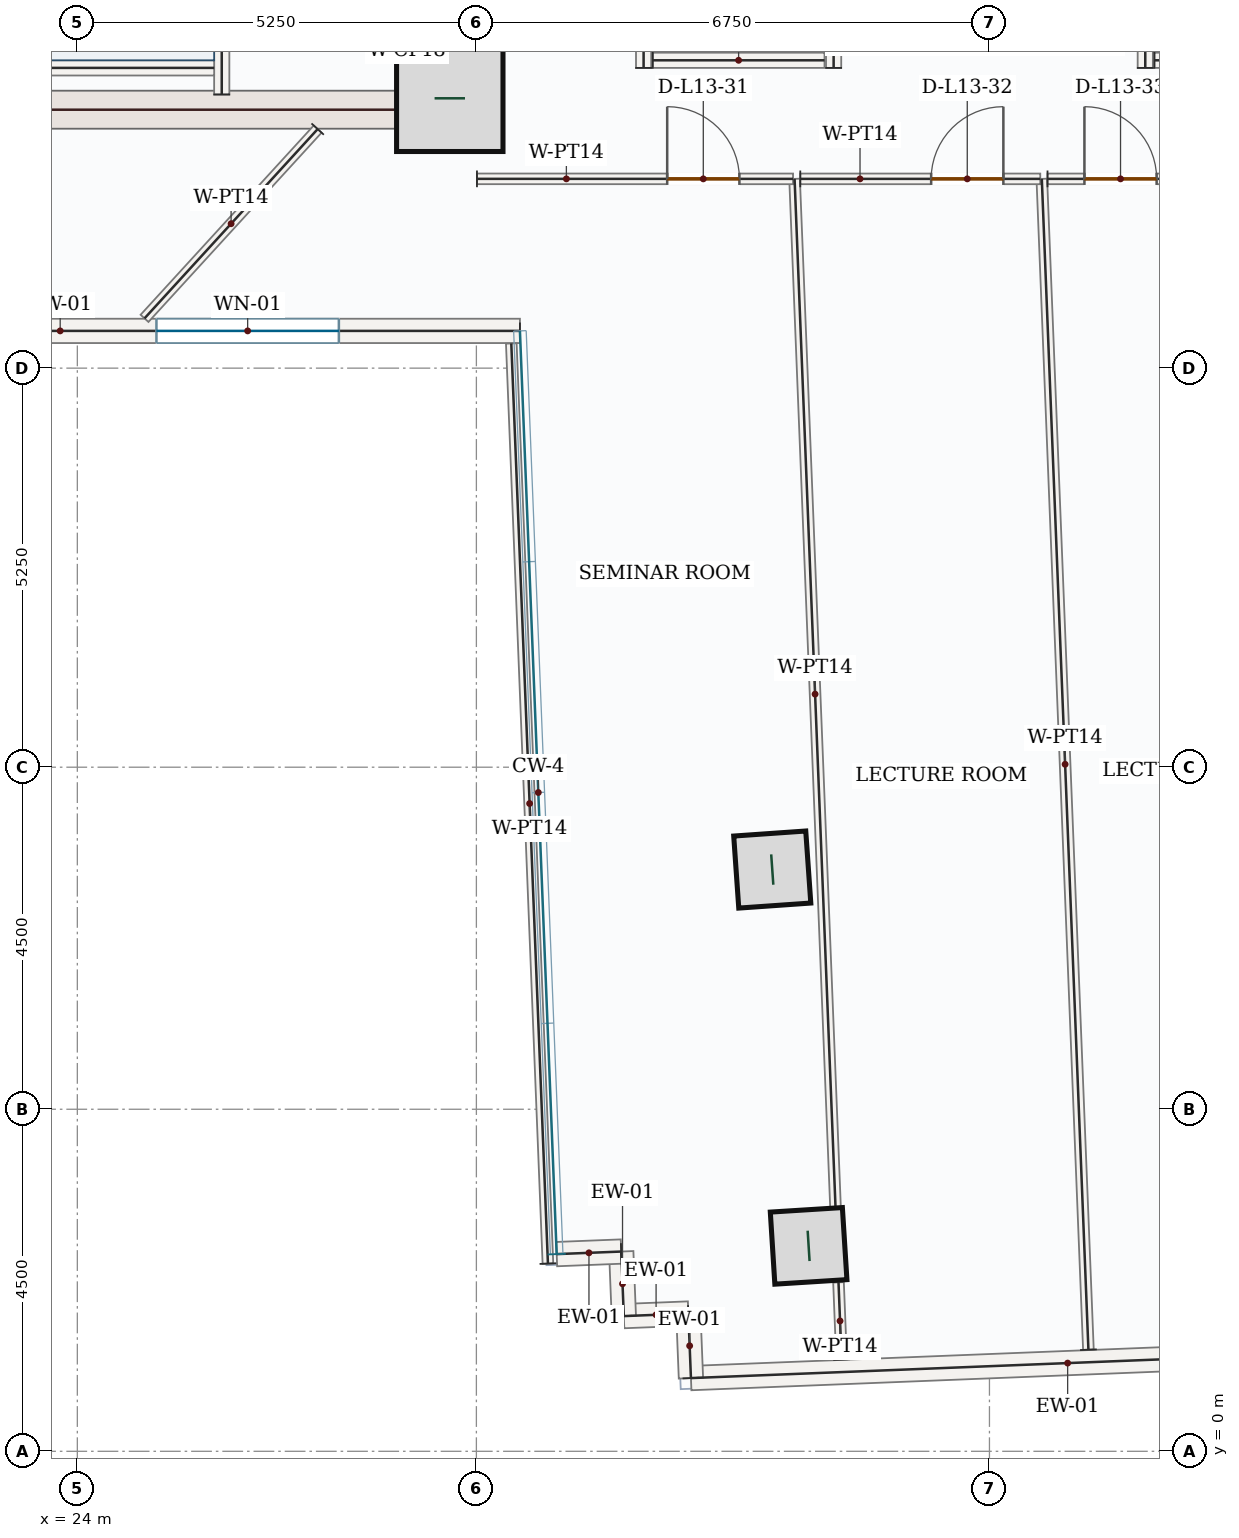
"""IFC4 building model, lengths in metres.
Left out: names, types, materials, properties, quantities, classifications, styles, units other than length and angle.
Written with IfcOpenShell. Run it as: python <this file> out.ifc"""

import sys

from ifc_helpers import new_model, si_unit, direction, frame, frame_2d, origin, origin_2d, place, context, subcontext, project, spatial, rectangle, hollow_rectangle, extrude, source, transform, mapped, element, fill, save


model = new_model("IFC4")
c1 = context("Model", 3, precision=1e-05, world=origin(), true_north=direction((0.0, 1.0)))
c2 = subcontext(c1, "Body", "Model", "MODEL_VIEW")
j1 = project(units=[si_unit("LENGTHUNIT", "METRE"), si_unit("PLANEANGLEUNIT", "RADIAN")], contexts=[c1])
p1 = place(None, origin())
s1 = spatial("IfcSite", under=j1, at=p1, CompositionType="ELEMENT")
p2 = place(p1, origin())
s2 = spatial("IfcBuilding", under=s1, at=p2, CompositionType="ELEMENT")
p3 = place(p2, frame((0.0, 0.0, 62.7)))
s3 = spatial("IfcBuildingStorey", under=s2, at=p3, CompositionType="ELEMENT", Elevation=62.7)
p4 = place(p3, frame((29.0, 17.4, 0.0), z_axis=(0.0, 0.0, 1.0), x_axis=(0.0, 1.0, 0.0)))
e1 = element("IfcWall", 1, at=p4, inside=s3, PredefinedType="SHEAR", context=c2, shape_type="SweptSolid", body=[
    extrude(rectangle(XDim=8.55, YDim=0.5, at=frame_2d((4.275, 0.0))), origin(), (0.0, 0.0, 1.0), 3.95),
])
p5 = place(p4, frame((6.65, 0.0, 0.0)))
e2 = element("IfcOpeningElement", 2, at=p5, cuts=e1, PredefinedType="OPENING", context=c2, shape_type="SweptSolid", body=[
    extrude(rectangle(XDim=1.1, YDim=2.2, at=frame_2d((0.55, 1.1))), frame((0.0, 0.26, 0.0), z_axis=(0.0, -1.0, 0.0), x_axis=(1.0, 0.0, 0.0)), (0.0, 0.0, 1.0), 0.52),
])
p6 = place(p4, frame((2.7, 0.0, 0.0)))
e3 = element("IfcOpeningElement", 3, at=p6, cuts=e1, PredefinedType="OPENING", context=c2, shape_type="SweptSolid", body=[
    extrude(rectangle(XDim=0.88, YDim=2.1, at=frame_2d((0.44, 1.05))), frame((0.0, 0.26, 0.0), z_axis=(0.0, -1.0, 0.0), x_axis=(1.0, 0.0, 0.0)), (0.0, 0.0, 1.0), 0.52),
])
p7 = place(p4, frame((4.6, 0.0, 0.0)))
e4 = element("IfcOpeningElement", 4, at=p7, cuts=e1, PredefinedType="OPENING", context=c2, shape_type="SweptSolid", body=[
    extrude(rectangle(XDim=0.88, YDim=2.1, at=frame_2d((0.44, 1.05))), frame((0.0, 0.26, 0.0), z_axis=(0.0, -1.0, 0.0), x_axis=(1.0, 0.0, 0.0)), (0.0, 0.0, 1.0), 0.52),
])
m1 = source(origin(), c2, "Body", "SweptSolid", [
    extrude(rectangle(XDim=7.0, YDim=0.5, at=frame_2d((3.5, 0.0))), origin(), (0.0, 0.0, 1.0), 3.95),
])
p8 = place(p3, frame((21.75, 17.65, 0.0), z_axis=(0.0, 0.0, 1.0), x_axis=(1.0, 0.0, 0.0)))
e5 = element("IfcWall", 5, at=p8, inside=s3, PredefinedType="SHEAR", context=c2, shape_type="MappedRepresentation", body=[
    mapped(m1, transform((0.0, 0.0, 0.0), x_axis=(1.0, 0.0, 0.0), y_axis=(0.0, 1.0, 0.0), z_axis=(0.0, 0.0, 1.0), scale=1.0)),
])
m2 = source(origin(), c2, "Body", "SweptSolid", [
    extrude(rectangle(XDim=1.4, YDim=1.4, at=origin_2d()), origin(), (0.0, 0.0, 1.0), 4.2),
])
p9 = place(p3, frame((28.9, 17.8, 0.0), z_axis=(0.0, 0.0, 1.0), x_axis=(1.0, 0.0, 0.0)))
e6 = element("IfcColumn", 6, at=p9, inside=s3, PredefinedType="COLUMN", context=c2, shape_type="MappedRepresentation", body=[
    mapped(m2, transform((0.0, 0.0, 0.0), x_axis=(1.0, 0.0, 0.0), y_axis=(0.0, 1.0, 0.0), z_axis=(0.0, 0.0, 1.0), scale=1.0)),
])
m3 = source(origin(), c2, "Body", "SweptSolid", [
    extrude(hollow_rectangle(XDim=0.95, YDim=0.95, WallThickness=0.05, at=origin_2d()), origin(), (0.0, 0.0, 1.0), 4.2),
])
for number, where, z_axis, x_axis in (
    (7, (33.143, 7.654, 0.0), (0.0, 0.0, 1.0), (-0.07, 0.998, 0.0)),
    (8, (33.621, 2.703, 0.0), (0.0, 0.0, 1.0), (-0.063, 0.998, 0.0)),
):
    element("IfcColumn", number, at=place(p3, frame(where, z_axis=z_axis, x_axis=x_axis)), inside=s3, PredefinedType="COLUMN", context=c2, shape_type="MappedRepresentation", body=[
        mapped(m3, transform((0.0, 0.0, 0.0), x_axis=(1.0, 0.0, 0.0), y_axis=(0.0, 1.0, 0.0), z_axis=(0.0, 0.0, 1.0), scale=1.0)),
    ])
m4 = source(origin(), c2, "Body", "SweptSolid", [
    extrude(rectangle(XDim=9.92, YDim=0.32, at=frame_2d((4.96, 0.0))), origin(), (0.0, 0.0, 1.0), 3.95),
])
p10 = place(p3, frame((41.985, 1.358, 0.0), z_axis=(0.0, 0.0, 1.0), x_axis=(-0.999207823998, -0.039796035749, 0.0)))
e9 = element("IfcWall", 9, at=p10, inside=s3, PredefinedType="SOLIDWALL", context=c2, shape_type="MappedRepresentation", body=[
    mapped(m4, transform((0.0, 0.0, 0.0), x_axis=(1.0, 0.0, 0.0), y_axis=(0.0, 1.0, 0.0), z_axis=(0.0, 0.0, 1.0), scale=1.0)),
])
m5 = source(origin(), c2, "Body", "SweptSolid", [
    extrude(rectangle(XDim=0.85, YDim=0.32, at=frame_2d((0.425, 0.0))), origin(), (0.0, 0.0, 1.0), 3.95),
])
p11 = place(p3, frame((32.073, 0.963, 0.0), z_axis=(0.0, 0.0, 1.0), x_axis=(-0.039922158152, 0.999202792875, 0.0)))
e10 = element("IfcWall", 10, at=p11, inside=s3, PredefinedType="SOLIDWALL", context=c2, shape_type="MappedRepresentation", body=[
    mapped(m5, transform((0.0, 0.0, 0.0), x_axis=(1.0, 0.0, 0.0), y_axis=(0.0, 1.0, 0.0), z_axis=(0.0, 0.0, 1.0), scale=1.0)),
])
m6 = source(origin(), c2, "Body", "SweptSolid", [
    extrude(rectangle(XDim=0.85, YDim=0.32, at=frame_2d((0.425, 0.0))), origin(), (0.0, 0.0, 1.0), 3.95),
])
for number, where, z_axis, x_axis in (
    (11, (32.039, 1.812, 0.0), (0.0, 0.0, 1.0), (-0.999, -0.04, 0.0)),
    (12, (31.19, 1.779, 0.0), (0.0, 0.0, 1.0), (-0.04, 0.999, 0.0)),
):
    element("IfcWall", number, at=place(p3, frame(where, z_axis=z_axis, x_axis=x_axis)), inside=s3, PredefinedType="SOLIDWALL", context=c2, shape_type="MappedRepresentation", body=[
        mapped(m6, transform((0.0, 0.0, 0.0), x_axis=(1.0, 0.0, 0.0), y_axis=(0.0, 1.0, 0.0), z_axis=(0.0, 0.0, 1.0), scale=1.0)),
    ])
p12 = place(p3, frame((31.156, 2.628, 0.0), z_axis=(0.0, 0.0, 1.0), x_axis=(-0.999214208752, -0.039635401209, 0.0)))
e13 = element("IfcWall", 13, at=p12, inside=s3, PredefinedType="SOLIDWALL", context=c2, shape_type="MappedRepresentation", body=[
    mapped(m5, transform((0.0, 0.0, 0.0), x_axis=(1.0, 0.0, 0.0), y_axis=(0.0, 1.0, 0.0), z_axis=(0.0, 0.0, 1.0), scale=1.0)),
])
p13 = place(p3, frame((29.823, 14.74, 0.0), z_axis=(0.0, 0.0, 1.0), x_axis=(-1.0, 0.0, 0.0)))
e14 = element("IfcWall", 14, at=p13, inside=s3, PredefinedType="SOLIDWALL", context=c2, shape_type="SweptSolid", body=[
    extrude(rectangle(XDim=7.165, YDim=0.32, at=frame_2d((3.583, 0.0))), origin(), (0.0, 0.0, 1.0), 3.95),
])
p14 = place(p13, frame((2.382, 0.0, 0.85)))
e15 = element("IfcOpeningElement", 15, at=p14, cuts=e14, PredefinedType="OPENING", context=c2, shape_type="SweptSolid", body=[
    extrude(rectangle(XDim=2.4, YDim=1.8, at=frame_2d((1.2, 0.9))), frame((0.0, 0.17, 0.0), z_axis=(0.0, -1.0, 0.0), x_axis=(1.0, 0.0, 0.0)), (0.0, 0.0, 1.0), 0.34),
])
p15 = place(p3, frame((25.9, 17.85, 0.0), z_axis=(0.0, 0.0, 1.0), x_axis=(0.0, 1.0, 0.0)))
e16 = element("IfcWall", 16, at=p15, inside=s3, PredefinedType="SOLIDWALL", context=c2, shape_type="SweptSolid", body=[
    extrude(rectangle(XDim=8.0, YDim=0.2, at=frame_2d((4.0, 0.0))), origin(), (0.0, 0.0, 1.0), 3.95),
])
p16 = place(p15, frame((6.3, 0.0, 0.0)))
e17 = element("IfcOpeningElement", 17, at=p16, cuts=e16, PredefinedType="OPENING", context=c2, shape_type="SweptSolid", body=[
    extrude(rectangle(XDim=1.05, YDim=2.15, at=frame_2d((0.525, 1.075))), frame((0.0, 0.11, 0.0), z_axis=(0.0, -1.0, 0.0), x_axis=(1.0, 0.0, 0.0)), (0.0, 0.0, 1.0), 0.22),
])
m7 = source(origin(), c2, "Body", "SweptSolid", [
    extrude(rectangle(XDim=3.25, YDim=0.2, at=frame_2d((1.625, 0.0))), origin(), (0.0, 0.0, 1.0), 3.95),
])
p17 = place(p3, frame((22.55, 18.2, 0.0), z_axis=(0.0, 0.0, 1.0), x_axis=(1.0, 0.0, 0.0)))
e18 = element("IfcWall", 18, at=p17, inside=s3, PredefinedType="SOLIDWALL", context=c2, shape_type="MappedRepresentation", body=[
    mapped(m7, transform((0.0, 0.0, 0.0), x_axis=(1.0, 0.0, 0.0), y_axis=(0.0, 1.0, 0.0), z_axis=(0.0, 0.0, 1.0), scale=1.0)),
])
m8 = source(origin(), c2, "Body", "SweptSolid", [
    extrude(rectangle(XDim=2.35, YDim=0.2, at=frame_2d((1.175, 0.0))), origin(), (0.0, 0.0, 1.0), 3.95),
])
for number, where, z_axis, x_axis in (
    (19, (31.45, 18.2, 0.0), (0.0, 0.0, 1.0), (0.0, 1.0, 0.0)),
    (20, (33.95, 18.2, 0.0), (0.0, 0.0, 1.0), (0.0, 1.0, 0.0)),
):
    element("IfcWall", number, at=place(p3, frame(where, z_axis=z_axis, x_axis=x_axis)), inside=s3, PredefinedType="SOLIDWALL", context=c2, shape_type="MappedRepresentation", body=[
        mapped(m8, transform((0.0, 0.0, 0.0), x_axis=(1.0, 0.0, 0.0), y_axis=(0.0, 1.0, 0.0), z_axis=(0.0, 0.0, 1.0), scale=1.0)),
    ])
m9 = source(origin(), c2, "Body", "SweptSolid", [
    extrude(rectangle(XDim=2.26, YDim=0.2, at=frame_2d((1.13, 0.0))), origin(), (0.0, 0.0, 1.0), 3.95),
])
p18 = place(p3, frame((31.57, 18.3, 0.0), z_axis=(0.0, 0.0, 1.0), x_axis=(1.0, 0.0, 0.0)))
e21 = element("IfcWall", 21, at=p18, inside=s3, PredefinedType="SOLIDWALL", context=c2, shape_type="MappedRepresentation", body=[
    mapped(m9, transform((0.0, 0.0, 0.0), x_axis=(1.0, 0.0, 0.0), y_axis=(0.0, 1.0, 0.0), z_axis=(0.0, 0.0, 1.0), scale=1.0)),
])
p19 = place(p3, frame((38.05, 18.2, 0.0), z_axis=(0.0, 0.0, 1.0), x_axis=(0.0, 1.0, 0.0)))
e22 = element("IfcWall", 22, at=p19, inside=s3, PredefinedType="SOLIDWALL", context=c2, shape_type="MappedRepresentation", body=[
    mapped(m8, transform((0.0, 0.0, 0.0), x_axis=(1.0, 0.0, 0.0), y_axis=(0.0, 1.0, 0.0), z_axis=(0.0, 0.0, 1.0), scale=1.0)),
])
p20 = place(p3, frame((38.17, 18.3, 0.0), z_axis=(0.0, 0.0, 1.0), x_axis=(1.0, 0.0, 0.0)))
e23 = element("IfcWall", 23, at=p20, inside=s3, PredefinedType="SOLIDWALL", context=c2, shape_type="MappedRepresentation", body=[
    mapped(m9, transform((0.0, 0.0, 0.0), x_axis=(1.0, 0.0, 0.0), y_axis=(0.0, 1.0, 0.0), z_axis=(0.0, 0.0, 1.0), scale=1.0)),
])
m10 = source(origin(), c2, "Body", "SweptSolid", [
    extrude(rectangle(XDim=15.416, YDim=0.14, at=frame_2d((7.708, 0.0))), origin(), (0.0, 0.0, 1.0), 3.95),
])
p21 = place(p3, frame((37.302, 1.336, 0.0), z_axis=(0.0, 0.0, 1.0), x_axis=(-0.039782723686, 0.999208354096, 0.0)))
e24 = element("IfcWall", 24, at=p21, inside=s3, PredefinedType="PARTITIONING", context=c2, shape_type="MappedRepresentation", body=[
    mapped(m10, transform((0.0, 0.0, 0.0), x_axis=(1.0, 0.0, 0.0), y_axis=(0.0, 1.0, 0.0), z_axis=(0.0, 0.0, 1.0), scale=1.0)),
])
p22 = place(p3, frame((36.764, 16.74, 0.0), z_axis=(0.0, 0.0, 1.0), x_axis=(1.0, 0.0, 0.0)))
e25 = element("IfcWall", 25, at=p22, inside=s3, PredefinedType="PARTITIONING", context=c2, shape_type="SweptSolid", body=[
    extrude(rectangle(XDim=3.157, YDim=0.14, at=frame_2d((1.579, 0.0))), origin(), (0.0, 0.0, 1.0), 3.95),
])
p23 = place(p22, frame((0.486, 0.0, 0.0)))
e26 = element("IfcOpeningElement", 26, at=p23, cuts=e25, PredefinedType="OPENING", context=c2, shape_type="SweptSolid", body=[
    extrude(rectangle(XDim=0.95, YDim=2.15, at=frame_2d((0.475, 1.075))), frame((0.0, 0.08, 0.0), z_axis=(0.0, -1.0, 0.0), x_axis=(1.0, 0.0, 0.0)), (0.0, 0.0, 1.0), 0.16),
])
m11 = source(origin(), c2, "Body", "SweptSolid", [
    extrude(rectangle(XDim=1.016, YDim=0.14, at=frame_2d((0.508, 0.0))), origin(), (0.0, 0.0, 1.0), 3.95),
])
p24 = place(p3, frame((34.055, 1.207, 0.0), z_axis=(0.0, 0.0, 1.0), x_axis=(-0.03988168596, 0.99920440908, 0.0)))
e27 = element("IfcWall", 27, at=p24, inside=s3, PredefinedType="PARTITIONING", context=c2, shape_type="MappedRepresentation", body=[
    mapped(m11, transform((0.0, 0.0, 0.0), x_axis=(1.0, 0.0, 0.0), y_axis=(0.0, 1.0, 0.0), z_axis=(0.0, 0.0, 1.0), scale=1.0)),
])
m12 = source(origin(), c2, "Body", "SweptSolid", [
    extrude(rectangle(XDim=13.568, YDim=0.14, at=frame_2d((6.784, 0.0))), origin(), (0.0, 0.0, 1.0), 3.95),
])
p25 = place(p3, frame((33.976, 3.183, 0.0), z_axis=(0.0, 0.0, 1.0), x_axis=(-0.039766111253, 0.99920901537, 0.0)))
e28 = element("IfcWall", 28, at=p25, inside=s3, PredefinedType="PARTITIONING", context=c2, shape_type="MappedRepresentation", body=[
    mapped(m12, transform((0.0, 0.0, 0.0), x_axis=(1.0, 0.0, 0.0), y_axis=(0.0, 1.0, 0.0), z_axis=(0.0, 0.0, 1.0), scale=1.0)),
])
p26 = place(p3, frame((33.511, 16.74, 0.0), z_axis=(0.0, 0.0, 1.0), x_axis=(1.0, 0.0, 0.0)))
e29 = element("IfcWall", 29, at=p26, inside=s3, PredefinedType="PARTITIONING", context=c2, shape_type="SweptSolid", body=[
    extrude(rectangle(XDim=3.157, YDim=0.14, at=frame_2d((1.579, 0.0))), origin(), (0.0, 0.0, 1.0), 3.95),
])
p27 = place(p26, frame((1.722, 0.0, 0.0)))
e30 = element("IfcOpeningElement", 30, at=p27, cuts=e29, PredefinedType="OPENING", context=c2, shape_type="SweptSolid", body=[
    extrude(rectangle(XDim=0.95, YDim=2.15, at=frame_2d((0.475, 1.075))), frame((0.0, 0.08, 0.0), z_axis=(0.0, -1.0, 0.0), x_axis=(1.0, 0.0, 0.0)), (0.0, 0.0, 1.0), 0.16),
])
m13 = source(origin(), c2, "Body", "SweptSolid", [
    extrude(rectangle(XDim=3.375, YDim=0.14, at=frame_2d((1.688, 0.0))), origin(), (0.0, 0.0, 1.0), 3.95),
])
p28 = place(p3, frame((27.162, 17.395, 0.0), z_axis=(0.0, 0.0, 1.0), x_axis=(-0.674974079893, -0.737841440604, 0.0)))
e31 = element("IfcWall", 31, at=p28, inside=s3, PredefinedType="PARTITIONING", context=c2, shape_type="MappedRepresentation", body=[
    mapped(m13, transform((0.0, 0.0, 0.0), x_axis=(1.0, 0.0, 0.0), y_axis=(0.0, 1.0, 0.0), z_axis=(0.0, 0.0, 1.0), scale=1.0)),
])
p29 = place(p3, frame((29.258, 16.74, 0.0), z_axis=(0.0, 0.0, 1.0), x_axis=(0.999999998277, -5.8706117e-05, 0.0)))
e32 = element("IfcWall", 32, at=p29, inside=s3, PredefinedType="PARTITIONING", context=c2, shape_type="SweptSolid", body=[
    extrude(rectangle(XDim=4.159, YDim=0.14, at=frame_2d((2.079, 0.0))), origin(), (0.0, 0.0, 1.0), 3.95),
])
p30 = place(p29, frame((2.503, 0.0, 0.0)))
e33 = element("IfcOpeningElement", 33, at=p30, cuts=e32, PredefinedType="OPENING", context=c2, shape_type="SweptSolid", body=[
    extrude(rectangle(XDim=0.95, YDim=2.15, at=frame_2d((0.475, 1.075))), frame((0.0, 0.08, 0.0), z_axis=(0.0, -1.0, 0.0), x_axis=(1.0, 0.0, 0.0)), (0.0, 0.0, 1.0), 0.16),
])
m14 = source(origin(), c2, "Body", "SweptSolid", [
    extrude(rectangle(XDim=12.115, YDim=0.14, at=frame_2d((6.058, 0.0))), origin(), (0.0, 0.0, 1.0), 3.95),
])
p31 = place(p3, frame((30.191, 2.469, 0.0), z_axis=(0.0, 0.0, 1.0), x_axis=(-0.039799837716, 0.999207672568, 0.0)))
e34 = element("IfcWall", 34, at=p31, inside=s3, PredefinedType="PARTITIONING", context=c2, shape_type="MappedRepresentation", body=[
    mapped(m14, transform((0.0, 0.0, 0.0), x_axis=(1.0, 0.0, 0.0), y_axis=(0.0, 1.0, 0.0), z_axis=(0.0, 0.0, 1.0), scale=1.0)),
])
m15 = source(origin(), c2, "Body", "SweptSolid", [
    extrude(rectangle(XDim=2.4, YDim=1.8, at=frame_2d((1.2, 0.9))), frame((0.0, 0.03, 0.0), z_axis=(0.0, -1.0, 0.0), x_axis=(1.0, 0.0, 0.0)), (0.0, 0.0, 1.0), 0.06),
])
p32 = place(p14, origin())
e35 = element("IfcWindow", 35, at=p32, inside=s3, PartitioningType="DOUBLE_PANEL_VERTICAL", PredefinedType="WINDOW", context=c2, shape_type="MappedRepresentation", body=[
    mapped(m15, transform((0.0, 0.0, 0.0), x_axis=(1.0, 0.0, 0.0), y_axis=(0.0, 1.0, 0.0), z_axis=(0.0, 0.0, 1.0), scale=1.0)),
])
fill(e15, e35)
m16 = source(origin(), c2, "Body", "SweptSolid", [
    extrude(rectangle(XDim=0.95, YDim=2.15, at=frame_2d((0.475, 1.075))), frame((0.0, 0.025, 0.0), z_axis=(0.0, -1.0, 0.0), x_axis=(1.0, 0.0, 0.0)), (0.0, 0.0, 1.0), 0.05),
])
p33 = place(p30, origin())
e36 = element("IfcDoor", 36, at=p33, inside=s3, OperationType="SINGLE_SWING_LEFT", PredefinedType="DOOR", context=c2, shape_type="MappedRepresentation", body=[
    mapped(m16, transform((0.0, 0.0, 0.0), x_axis=(1.0, 0.0, 0.0), y_axis=(0.0, 1.0, 0.0), z_axis=(0.0, 0.0, 1.0), scale=1.0)),
])
fill(e33, e36)
p34 = place(p27, origin())
e37 = element("IfcDoor", 37, at=p34, inside=s3, OperationType="SINGLE_SWING_RIGHT", PredefinedType="DOOR", context=c2, shape_type="MappedRepresentation", body=[
    mapped(m16, transform((0.0, 0.0, 0.0), x_axis=(1.0, 0.0, 0.0), y_axis=(0.0, 1.0, 0.0), z_axis=(0.0, 0.0, 1.0), scale=1.0)),
])
fill(e30, e37)
p35 = place(p23, origin())
e38 = element("IfcDoor", 38, at=p35, inside=s3, OperationType="SINGLE_SWING_LEFT", PredefinedType="DOOR", context=c2, shape_type="MappedRepresentation", body=[
    mapped(m16, transform((0.0, 0.0, 0.0), x_axis=(1.0, 0.0, 0.0), y_axis=(0.0, 1.0, 0.0), z_axis=(0.0, 0.0, 1.0), scale=1.0)),
])
fill(e26, e38)
save(model, sys.argv[1])
